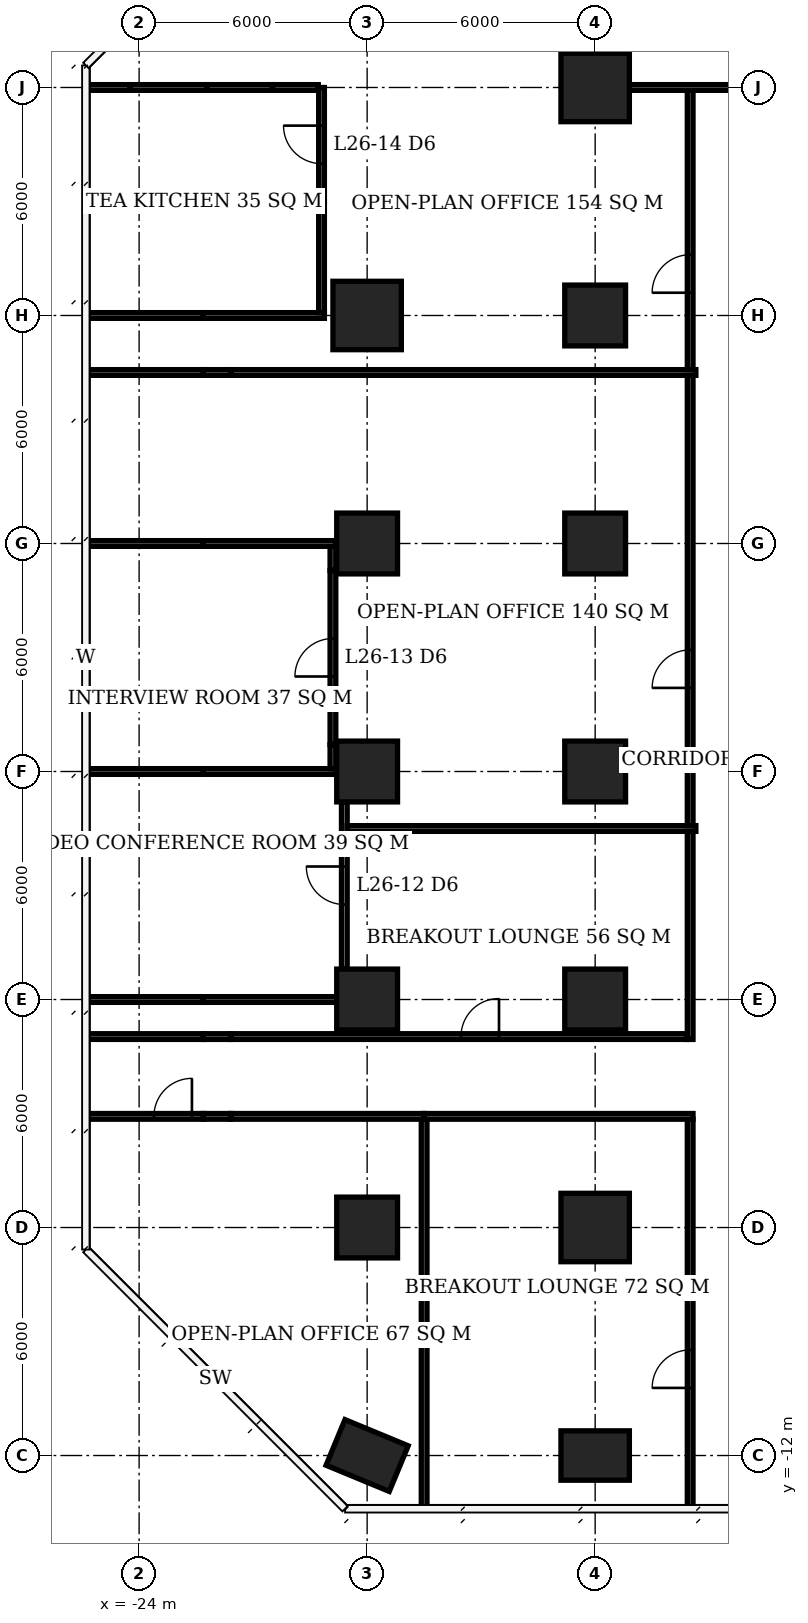
"""IFC4 building model, lengths in metres.
Left out: names, types, materials, properties, quantities, classifications, styles, units other than length and angle.
Written with IfcOpenShell. Run it as: python <this file> out.ifc"""

import sys

from ifc_helpers import new_model, si_unit, direction, frame, frame_2d, origin, origin_2d, place, context, subcontext, project, spatial, rectangle, extrude, element, fill, save


model = new_model("IFC4")
c1 = context("Model", 3, precision=1e-05, world=origin(), true_north=direction((0.0, 1.0)))
c2 = subcontext(c1, "Body", "Model", "MODEL_VIEW")
j1 = project(units=[si_unit("LENGTHUNIT", "METRE"), si_unit("PLANEANGLEUNIT", "RADIAN")], contexts=[c1])
p1 = place(None, origin())
s1 = spatial("IfcSite", under=j1, at=p1, CompositionType="ELEMENT")
p2 = place(p1, origin())
s2 = spatial("IfcBuilding", under=s1, at=p2, CompositionType="ELEMENT")
p3 = place(p2, frame((0.0, 0.0, 109.4)))
s3 = spatial("IfcBuildingStorey", under=s2, at=p3, CompositionType="ELEMENT", Elevation=109.4)
p4 = place(p3, frame((-18.0, -12.0, 0.0), z_axis=(0.0, 0.0, 1.0), x_axis=(-0.923879532511, 0.382683432365, 0.0)))
e1 = element("IfcColumn", 1, at=p4, inside=s3, PredefinedType="COLUMN", context=c2, shape_type="SweptSolid", body=[
    extrude(rectangle(XDim=1.8, YDim=1.3, at=origin_2d()), origin(), (0.0, 0.0, 1.0), 3.9),
])
for number, where, z_axis, x_axis in (
    (2, (-18.0, -6.0, 0.0), (0.0, 0.0, 1.0), (1.0, 0.0, 0.0)),
    (3, (-18.0, 0.0, 0.0), (0.0, 0.0, 1.0), (1.0, 0.0, 0.0)),
    (4, (-18.0, 6.0, 0.0), (0.0, 0.0, 1.0), (1.0, 0.0, 0.0)),
    (5, (-18.0, 12.0, 0.0), (0.0, 0.0, 1.0), (1.0, 0.0, 0.0)),
):
    element("IfcColumn", number, at=place(p3, frame(where, z_axis=z_axis, x_axis=x_axis)), inside=s3, PredefinedType="COLUMN", context=c2, shape_type="SweptSolid", body=[
        extrude(rectangle(XDim=1.6, YDim=1.6, at=origin_2d()), origin(), (0.0, 0.0, 1.0), 3.9),
    ])
p5 = place(p3, frame((-18.0, 18.0, 0.0), z_axis=(0.0, 0.0, 1.0), x_axis=(1.0, 0.0, 0.0)))
e6 = element("IfcColumn", 6, at=p5, inside=s3, PredefinedType="COLUMN", context=c2, shape_type="SweptSolid", body=[
    extrude(rectangle(XDim=1.8, YDim=1.8, at=origin_2d()), origin(), (0.0, 0.0, 1.0), 3.9),
])
p6 = place(p3, frame((-12.0, -12.0, 0.0), z_axis=(0.0, 0.0, 1.0), x_axis=(1.0, 0.0, 0.0)))
e7 = element("IfcColumn", 7, at=p6, inside=s3, PredefinedType="COLUMN", context=c2, shape_type="SweptSolid", body=[
    extrude(rectangle(XDim=1.8, YDim=1.3, at=origin_2d()), origin(), (0.0, 0.0, 1.0), 3.9),
])
p7 = place(p3, frame((-12.0, -6.0, 0.0), z_axis=(0.0, 0.0, 1.0), x_axis=(1.0, 0.0, 0.0)))
e8 = element("IfcColumn", 8, at=p7, inside=s3, PredefinedType="COLUMN", context=c2, shape_type="SweptSolid", body=[
    extrude(rectangle(XDim=1.8, YDim=1.8, at=origin_2d()), origin(), (0.0, 0.0, 1.0), 3.9),
])
for number, where, z_axis, x_axis in (
    (9, (-12.0, 0.0, 0.0), (0.0, 0.0, 1.0), (1.0, 0.0, 0.0)),
    (10, (-12.0, 6.0, 0.0), (0.0, 0.0, 1.0), (1.0, 0.0, 0.0)),
    (11, (-12.0, 12.0, 0.0), (0.0, 0.0, 1.0), (1.0, 0.0, 0.0)),
    (12, (-12.0, 18.0, 0.0), (0.0, 0.0, 1.0), (1.0, 0.0, 0.0)),
):
    element("IfcColumn", number, at=place(p3, frame(where, z_axis=z_axis, x_axis=x_axis)), inside=s3, PredefinedType="COLUMN", context=c2, shape_type="SweptSolid", body=[
        extrude(rectangle(XDim=1.6, YDim=1.6, at=origin_2d()), origin(), (0.0, 0.0, 1.0), 3.9),
    ])
p8 = place(p3, frame((-12.0, 24.0, 0.0), z_axis=(0.0, 0.0, 1.0), x_axis=(1.0, 0.0, 0.0)))
e13 = element("IfcColumn", 13, at=p8, inside=s3, PredefinedType="COLUMN", context=c2, shape_type="SweptSolid", body=[
    extrude(rectangle(XDim=1.8, YDim=1.8, at=origin_2d()), origin(), (0.0, 0.0, 1.0), 3.9),
])
p9 = place(p3, frame((-25.4, 0.0, 0.0), z_axis=(0.0, 0.0, 1.0), x_axis=(1.0, 0.0, 0.0)))
e14 = element("IfcWall", 14, at=p9, inside=s3, PredefinedType="PARTITIONING", context=c2, shape_type="SweptSolid", body=[
    extrude(rectangle(XDim=3.09, YDim=0.15, at=frame_2d((1.545, 0.0))), origin(), (0.0, 0.0, 1.0), 3.65),
])
p10 = place(p3, frame((-22.31, 0.0, 0.0), z_axis=(0.0, 0.0, 1.0), x_axis=(1.0, 0.0, 0.0)))
e15 = element("IfcWall", 15, at=p10, inside=s3, PredefinedType="PARTITIONING", context=c2, shape_type="SweptSolid", body=[
    extrude(rectangle(XDim=3.51, YDim=0.15, at=frame_2d((1.755, 0.0))), origin(), (0.0, 0.0, 1.0), 2.65),
])
p11 = place(p3, frame((-25.35, 6.0, 0.0), z_axis=(0.0, 0.0, 1.0), x_axis=(1.0, 0.0, 0.0)))
e16 = element("IfcWall", 16, at=p11, inside=s3, PredefinedType="PARTITIONING", context=c2, shape_type="SweptSolid", body=[
    extrude(rectangle(XDim=3.04, YDim=0.15, at=frame_2d((1.52, 0.0))), origin(), (0.0, 0.0, 1.0), 3.65),
])
p12 = place(p3, frame((-22.31, 6.0, 0.0), z_axis=(0.0, 0.0, 1.0), x_axis=(1.0, 0.0, 0.0)))
e17 = element("IfcWall", 17, at=p12, inside=s3, PredefinedType="PARTITIONING", context=c2, shape_type="SweptSolid", body=[
    extrude(rectangle(XDim=3.485, YDim=0.15, at=frame_2d((1.743, 0.0))), origin(), (0.0, 0.0, 1.0), 2.65),
])
p13 = place(p3, frame((-25.35, 12.0, 0.0), z_axis=(0.0, 0.0, 1.0), x_axis=(1.0, 0.0, 0.0)))
e18 = element("IfcWall", 18, at=p13, inside=s3, PredefinedType="PARTITIONING", context=c2, shape_type="SweptSolid", body=[
    extrude(rectangle(XDim=3.04, YDim=0.15, at=frame_2d((1.52, 0.0))), origin(), (0.0, 0.0, 1.0), 3.65),
])
p14 = place(p3, frame((-22.31, 12.0, 0.0), z_axis=(0.0, 0.0, 1.0), x_axis=(1.0, 0.0, 0.0)))
e19 = element("IfcWall", 19, at=p14, inside=s3, PredefinedType="PARTITIONING", context=c2, shape_type="SweptSolid", body=[
    extrude(rectangle(XDim=3.485, YDim=0.15, at=frame_2d((1.743, 0.0))), origin(), (0.0, 0.0, 1.0), 2.65),
])
p15 = place(p3, frame((-25.4, 18.0, 0.0), z_axis=(0.0, 0.0, 1.0), x_axis=(1.0, 0.0, 0.0)))
e20 = element("IfcWall", 20, at=p15, inside=s3, PredefinedType="PARTITIONING", context=c2, shape_type="SweptSolid", body=[
    extrude(rectangle(XDim=3.09, YDim=0.15, at=frame_2d((1.545, 0.0))), origin(), (0.0, 0.0, 1.0), 3.65),
])
p16 = place(p3, frame((-22.31, 18.0, 0.0), z_axis=(0.0, 0.0, 1.0), x_axis=(1.0, 0.0, 0.0)))
e21 = element("IfcWall", 21, at=p16, inside=s3, PredefinedType="PARTITIONING", context=c2, shape_type="SweptSolid", body=[
    extrude(rectangle(XDim=3.185, YDim=0.15, at=frame_2d((1.593, 0.0))), origin(), (0.0, 0.0, 1.0), 2.65),
])
p17 = place(p3, frame((-25.4, 24.0, 0.0), z_axis=(0.0, 0.0, 1.0), x_axis=(1.0, 0.0, 0.0)))
e22 = element("IfcWall", 22, at=p17, inside=s3, PredefinedType="PARTITIONING", context=c2, shape_type="SweptSolid", body=[
    extrude(rectangle(XDim=1.163, YDim=0.15, at=frame_2d((0.582, 0.0))), origin(), (0.0, 0.0, 1.0), 3.65),
])
p18 = place(p3, frame((-24.237, 24.0, 0.0), z_axis=(0.0, 0.0, 1.0), x_axis=(1.0, 0.0, 0.0)))
e23 = element("IfcWall", 23, at=p18, inside=s3, PredefinedType="PARTITIONING", context=c2, shape_type="SweptSolid", body=[
    extrude(rectangle(XDim=2.029, YDim=0.15, at=frame_2d((1.015, 0.0))), origin(), (0.0, 0.0, 1.0), 2.65),
])
p19 = place(p3, frame((-22.208, 24.0, 0.0), z_axis=(0.0, 0.0, 1.0), x_axis=(1.0, 0.0, 0.0)))
e24 = element("IfcWall", 24, at=p19, inside=s3, PredefinedType="PARTITIONING", context=c2, shape_type="SweptSolid", body=[
    extrude(rectangle(XDim=1.718, YDim=0.15, at=frame_2d((0.859, 0.0))), origin(), (0.0, 0.0, 1.0), 3.65),
])
p20 = place(p3, frame((-20.49, 24.0, 0.0), z_axis=(0.0, 0.0, 1.0), x_axis=(1.0, 0.0, 0.0)))
e25 = element("IfcWall", 25, at=p20, inside=s3, PredefinedType="PARTITIONING", context=c2, shape_type="SweptSolid", body=[
    extrude(rectangle(XDim=1.205, YDim=0.15, at=frame_2d((0.603, 0.0))), origin(), (0.0, 0.0, 1.0), 2.65),
])
p21 = place(p3, frame((-11.1, 24.0, 0.0), z_axis=(0.0, 0.0, 1.0), x_axis=(1.0, 0.0, 0.0)))
e26 = element("IfcWall", 26, at=p21, inside=s3, PredefinedType="PARTITIONING", context=c2, shape_type="SweptSolid", body=[
    extrude(rectangle(XDim=4.3, YDim=0.15, at=frame_2d((2.15, 0.0))), origin(), (0.0, 0.0, 1.0), 3.65),
])
p22 = place(p3, frame((-19.2, 18.075, 0.0), z_axis=(0.0, 0.0, 1.0), x_axis=(0.0, 1.0, 0.0)))
e27 = element("IfcWall", 27, at=p22, inside=s3, PredefinedType="PARTITIONING", context=c2, shape_type="SweptSolid", body=[
    extrude(rectangle(XDim=2.917, YDim=0.15, at=frame_2d((1.458, 0.0))), origin(), (0.0, 0.0, 1.0), 2.65),
])
p23 = place(p3, frame((-19.2, 20.992, 0.0), z_axis=(0.0, 0.0, 1.0), x_axis=(0.0, 1.0, 0.0)))
e28 = element("IfcWall", 28, at=p23, inside=s3, PredefinedType="PARTITIONING", context=c2, shape_type="SweptSolid", body=[
    extrude(rectangle(XDim=3.008, YDim=0.15, at=frame_2d((1.504, 0.0))), origin(), (0.0, 0.0, 1.0), 3.65),
])
p24 = place(p23, frame((1.004, 0.0, 0.0)))
e29 = element("IfcOpeningElement", 29, at=p24, cuts=e28, PredefinedType="OPENING", context=c2, shape_type="SweptSolid", body=[
    extrude(rectangle(XDim=1.0, YDim=2.1, at=frame_2d((0.5, 1.05))), frame((0.0, 0.085, 0.0), z_axis=(0.0, -1.0, 0.0), x_axis=(1.0, 0.0, 0.0)), (0.0, 0.0, 1.0), 0.17),
])
p25 = place(p3, frame((-18.9, 6.075, 0.0), z_axis=(0.0, 0.0, 1.0), x_axis=(0.0, 1.0, 0.0)))
e30 = element("IfcWall", 30, at=p25, inside=s3, PredefinedType="PARTITIONING", context=c2, shape_type="SweptSolid", body=[
    extrude(rectangle(XDim=0.635, YDim=0.15, at=frame_2d((0.317, 0.0))), origin(), (0.0, 0.0, 1.0), 2.65),
])
p26 = place(p3, frame((-18.9, 6.71, 0.0), z_axis=(0.0, 0.0, 1.0), x_axis=(0.0, 1.0, 0.0)))
e31 = element("IfcWall", 31, at=p26, inside=s3, PredefinedType="PARTITIONING", context=c2, shape_type="SweptSolid", body=[
    extrude(rectangle(XDim=4.58, YDim=0.15, at=frame_2d((2.29, 0.0))), origin(), (0.0, 0.0, 1.0), 3.65),
])
p27 = place(p26, frame((1.79, 0.0, 0.0)))
e32 = element("IfcOpeningElement", 32, at=p27, cuts=e31, PredefinedType="OPENING", context=c2, shape_type="SweptSolid", body=[
    extrude(rectangle(XDim=1.0, YDim=2.1, at=frame_2d((0.5, 1.05))), frame((0.0, 0.085, 0.0), z_axis=(0.0, -1.0, 0.0), x_axis=(1.0, 0.0, 0.0)), (0.0, 0.0, 1.0), 0.17),
])
p28 = place(p3, frame((-18.9, 11.29, 0.0), z_axis=(0.0, 0.0, 1.0), x_axis=(0.0, 1.0, 0.0)))
e33 = element("IfcWall", 33, at=p28, inside=s3, PredefinedType="PARTITIONING", context=c2, shape_type="SweptSolid", body=[
    extrude(rectangle(XDim=0.635, YDim=0.15, at=frame_2d((0.317, 0.0))), origin(), (0.0, 0.0, 1.0), 2.65),
])
p29 = place(p3, frame((-18.6, 0.8, 0.0), z_axis=(0.0, 0.0, 1.0), x_axis=(0.0, 1.0, 0.0)))
e34 = element("IfcWall", 34, at=p29, inside=s3, PredefinedType="PARTITIONING", context=c2, shape_type="SweptSolid", body=[
    extrude(rectangle(XDim=4.4, YDim=0.15, at=frame_2d((2.2, 0.0))), origin(), (0.0, 0.0, 1.0), 3.65),
])
p30 = place(p29, frame((1.7, 0.0, 0.0)))
e35 = element("IfcOpeningElement", 35, at=p30, cuts=e34, PredefinedType="OPENING", context=c2, shape_type="SweptSolid", body=[
    extrude(rectangle(XDim=1.0, YDim=2.1, at=frame_2d((0.5, 1.05))), frame((0.0, 0.085, 0.0), z_axis=(0.0, -1.0, 0.0), x_axis=(1.0, 0.0, 0.0)), (0.0, 0.0, 1.0), 0.17),
])
p31 = place(p3, frame((-12.0, 24.9, 0.0), z_axis=(0.0, 0.0, 1.0), x_axis=(0.0, 1.0, 0.0)))
e36 = element("IfcWall", 36, at=p31, inside=s3, PredefinedType="PARTITIONING", context=c2, shape_type="SweptSolid", body=[
    extrude(rectangle(XDim=3.41, YDim=0.15, at=frame_2d((1.705, 0.0))), origin(), (0.0, 0.0, 1.0), 2.65),
])
p32 = place(p3, frame((-25.4, -3.075, 0.0), z_axis=(0.0, 0.0, 1.0), x_axis=(1.0, 0.0, 0.0)))
e37 = element("IfcWall", 37, at=p32, inside=s3, PredefinedType="PARTITIONING", context=c2, shape_type="SweptSolid", body=[
    extrude(rectangle(XDim=3.09, YDim=0.15, at=frame_2d((1.545, 0.0))), origin(), (0.0, 0.0, 1.0), 3.65),
])
p33 = place(p32, frame((1.79, 0.0, 0.0)))
e38 = element("IfcOpeningElement", 38, at=p33, cuts=e37, PredefinedType="OPENING", context=c2, shape_type="SweptSolid", body=[
    extrude(rectangle(XDim=1.0, YDim=2.1, at=frame_2d((0.5, 1.05))), frame((0.0, 0.085, 0.0), z_axis=(0.0, -1.0, 0.0), x_axis=(1.0, 0.0, 0.0)), (0.0, 0.0, 1.0), 0.17),
])
p34 = place(p3, frame((-22.31, -3.075, 0.0), z_axis=(0.0, 0.0, 1.0), x_axis=(1.0, 0.0, 0.0)))
e39 = element("IfcWall", 39, at=p34, inside=s3, PredefinedType="PARTITIONING", context=c2, shape_type="SweptSolid", body=[
    extrude(rectangle(XDim=0.72, YDim=0.15, at=frame_2d((0.36, 0.0))), origin(), (0.0, 0.0, 1.0), 2.65),
])
p35 = place(p3, frame((-21.59, -3.075, 0.0), z_axis=(0.0, 0.0, 1.0), x_axis=(1.0, 0.0, 0.0)))
e40 = element("IfcWall", 40, at=p35, inside=s3, PredefinedType="PARTITIONING", context=c2, shape_type="SweptSolid", body=[
    extrude(rectangle(XDim=5.09, YDim=0.15, at=frame_2d((2.545, 0.0))), origin(), (0.0, 0.0, 1.0), 3.65),
])
p36 = place(p3, frame((-25.4, -0.975, 0.0), z_axis=(0.0, 0.0, 1.0), x_axis=(1.0, 0.0, 0.0)))
e41 = element("IfcWall", 41, at=p36, inside=s3, PredefinedType="PARTITIONING", context=c2, shape_type="SweptSolid", body=[
    extrude(rectangle(XDim=3.09, YDim=0.15, at=frame_2d((1.545, 0.0))), origin(), (0.0, 0.0, 1.0), 3.65),
])
p37 = place(p3, frame((-22.31, -0.975, 0.0), z_axis=(0.0, 0.0, 1.0), x_axis=(1.0, 0.0, 0.0)))
e42 = element("IfcWall", 42, at=p37, inside=s3, PredefinedType="PARTITIONING", context=c2, shape_type="SweptSolid", body=[
    extrude(rectangle(XDim=0.72, YDim=0.15, at=frame_2d((0.36, 0.0))), origin(), (0.0, 0.0, 1.0), 2.65),
])
p38 = place(p3, frame((-21.59, -0.975, 0.0), z_axis=(0.0, 0.0, 1.0), x_axis=(1.0, 0.0, 0.0)))
e43 = element("IfcWall", 43, at=p38, inside=s3, PredefinedType="PARTITIONING", context=c2, shape_type="SweptSolid", body=[
    extrude(rectangle(XDim=12.015, YDim=0.15, at=frame_2d((6.008, 0.0))), origin(), (0.0, 0.0, 1.0), 3.65),
])
p39 = place(p38, frame((6.06, 0.0, 0.0)))
e44 = element("IfcOpeningElement", 44, at=p39, cuts=e43, PredefinedType="OPENING", context=c2, shape_type="SweptSolid", body=[
    extrude(rectangle(XDim=1.0, YDim=2.1, at=frame_2d((0.5, 1.05))), frame((0.0, 0.085, 0.0), z_axis=(0.0, -1.0, 0.0), x_axis=(1.0, 0.0, 0.0)), (0.0, 0.0, 1.0), 0.17),
])
p40 = place(p3, frame((-25.4, 16.5, 0.0), z_axis=(0.0, 0.0, 1.0), x_axis=(1.0, 0.0, 0.0)))
e45 = element("IfcWall", 45, at=p40, inside=s3, PredefinedType="PARTITIONING", context=c2, shape_type="SweptSolid", body=[
    extrude(rectangle(XDim=3.09, YDim=0.15, at=frame_2d((1.545, 0.0))), origin(), (0.0, 0.0, 1.0), 3.65),
])
p41 = place(p3, frame((-22.31, 16.5, 0.0), z_axis=(0.0, 0.0, 1.0), x_axis=(1.0, 0.0, 0.0)))
e46 = element("IfcWall", 46, at=p41, inside=s3, PredefinedType="PARTITIONING", context=c2, shape_type="SweptSolid", body=[
    extrude(rectangle(XDim=0.72, YDim=0.15, at=frame_2d((0.36, 0.0))), origin(), (0.0, 0.0, 1.0), 2.65),
])
p42 = place(p3, frame((-21.59, 16.5, 0.0), z_axis=(0.0, 0.0, 1.0), x_axis=(1.0, 0.0, 0.0)))
e47 = element("IfcWall", 47, at=p42, inside=s3, PredefinedType="PARTITIONING", context=c2, shape_type="SweptSolid", body=[
    extrude(rectangle(XDim=12.24, YDim=0.15, at=frame_2d((6.12, 0.0))), origin(), (0.0, 0.0, 1.0), 3.65),
])
p43 = place(p3, frame((-18.525, 4.5, 0.0), z_axis=(0.0, 0.0, 1.0), x_axis=(1.0, 0.0, 0.0)))
e48 = element("IfcWall", 48, at=p43, inside=s3, PredefinedType="PARTITIONING", context=c2, shape_type="SweptSolid", body=[
    extrude(rectangle(XDim=9.175, YDim=0.15, at=frame_2d((4.587, 0.0))), origin(), (0.0, 0.0, 1.0), 3.65),
])
p44 = place(p3, frame((-16.5, -13.4, 0.0), z_axis=(0.0, 0.0, 1.0), x_axis=(0.0, 1.0, 0.0)))
e49 = element("IfcWall", 49, at=p44, inside=s3, PredefinedType="PARTITIONING", context=c2, shape_type="SweptSolid", body=[
    extrude(rectangle(XDim=10.25, YDim=0.15, at=frame_2d((5.125, 0.0))), origin(), (0.0, 0.0, 1.0), 3.65),
])
p45 = place(p3, frame((-16.5, -3.075, 0.0), z_axis=(0.0, 0.0, 1.0), x_axis=(1.0, 0.0, 0.0)))
e50 = element("IfcWall", 50, at=p45, inside=s3, PredefinedType="PARTITIONING", context=c2, shape_type="SweptSolid", body=[
    extrude(rectangle(XDim=7.075, YDim=0.15, at=frame_2d((3.538, 0.0))), origin(), (0.0, 0.0, 1.0), 3.65),
])
p46 = place(p3, frame((-9.5, -13.4, 0.0), z_axis=(0.0, 0.0, 1.0), x_axis=(0.0, 1.0, 0.0)))
e51 = element("IfcWall", 51, at=p46, inside=s3, PredefinedType="PARTITIONING", context=c2, shape_type="SweptSolid", body=[
    extrude(rectangle(XDim=10.25, YDim=0.15, at=frame_2d((5.125, 0.0))), origin(), (0.0, 0.0, 1.0), 3.65),
])
p47 = place(p46, frame((3.179, 0.0, 0.0)))
e52 = element("IfcOpeningElement", 52, at=p47, cuts=e51, PredefinedType="OPENING", context=c2, shape_type="SweptSolid", body=[
    extrude(rectangle(XDim=1.0, YDim=2.1, at=frame_2d((0.5, 1.05))), frame((0.0, 0.085, 0.0), z_axis=(0.0, -1.0, 0.0), x_axis=(1.0, 0.0, 0.0)), (0.0, 0.0, 1.0), 0.17),
])
p48 = place(p3, frame((-9.5, -1.05, 0.0), z_axis=(0.0, 0.0, 1.0), x_axis=(0.0, 1.0, 0.0)))
e53 = element("IfcWall", 53, at=p48, inside=s3, PredefinedType="PARTITIONING", context=c2, shape_type="SweptSolid", body=[
    extrude(rectangle(XDim=5.475, YDim=0.15, at=frame_2d((2.738, 0.0))), origin(), (0.0, 0.0, 1.0), 3.65),
])
p49 = place(p3, frame((-9.5, 4.575, 0.0), z_axis=(0.0, 0.0, 1.0), x_axis=(0.0, 1.0, 0.0)))
e54 = element("IfcWall", 54, at=p49, inside=s3, PredefinedType="PARTITIONING", context=c2, shape_type="SweptSolid", body=[
    extrude(rectangle(XDim=11.85, YDim=0.15, at=frame_2d((5.925, 0.0))), origin(), (0.0, 0.0, 1.0), 3.65),
])
p50 = place(p49, frame((3.625, 0.0, 0.0)))
e55 = element("IfcOpeningElement", 55, at=p50, cuts=e54, PredefinedType="OPENING", context=c2, shape_type="SweptSolid", body=[
    extrude(rectangle(XDim=1.0, YDim=2.1, at=frame_2d((0.5, 1.05))), frame((0.0, 0.085, 0.0), z_axis=(0.0, -1.0, 0.0), x_axis=(1.0, 0.0, 0.0)), (0.0, 0.0, 1.0), 0.17),
])
p51 = place(p3, frame((-9.5, 16.575, 0.0), z_axis=(0.0, 0.0, 1.0), x_axis=(0.0, 1.0, 0.0)))
e56 = element("IfcWall", 56, at=p51, inside=s3, PredefinedType="PARTITIONING", context=c2, shape_type="SweptSolid", body=[
    extrude(rectangle(XDim=7.35, YDim=0.15, at=frame_2d((3.675, 0.0))), origin(), (0.0, 0.0, 1.0), 3.65),
])
p52 = place(p51, frame((2.024, 0.0, 0.0)))
e57 = element("IfcOpeningElement", 57, at=p52, cuts=e56, PredefinedType="OPENING", context=c2, shape_type="SweptSolid", body=[
    extrude(rectangle(XDim=1.0, YDim=2.1, at=frame_2d((0.5, 1.05))), frame((0.0, 0.085, 0.0), z_axis=(0.0, -1.0, 0.0), x_axis=(1.0, 0.0, 0.0)), (0.0, 0.0, 1.0), 0.17),
])
p53 = place(p30, origin())
e58 = element("IfcDoor", 58, at=p53, inside=s3, OperationType="SINGLE_SWING_RIGHT", PredefinedType="DOOR", context=c2, shape_type="SweptSolid", body=[
    extrude(rectangle(XDim=1.0, YDim=2.1, at=frame_2d((0.5, 1.05))), frame((0.0, 0.025, 0.0), z_axis=(0.0, -1.0, 0.0), x_axis=(1.0, 0.0, 0.0)), (0.0, 0.0, 1.0), 0.05),
])
fill(e35, e58)
p54 = place(p27, origin())
e59 = element("IfcDoor", 59, at=p54, inside=s3, OperationType="SINGLE_SWING_LEFT", PredefinedType="DOOR", context=c2, shape_type="SweptSolid", body=[
    extrude(rectangle(XDim=1.0, YDim=2.1, at=frame_2d((0.5, 1.05))), frame((0.0, 0.025, 0.0), z_axis=(0.0, -1.0, 0.0), x_axis=(1.0, 0.0, 0.0)), (0.0, 0.0, 1.0), 0.05),
])
fill(e32, e59)
p55 = place(p24, origin())
e60 = element("IfcDoor", 60, at=p55, inside=s3, OperationType="SINGLE_SWING_RIGHT", PredefinedType="DOOR", context=c2, shape_type="SweptSolid", body=[
    extrude(rectangle(XDim=1.0, YDim=2.1, at=frame_2d((0.5, 1.05))), frame((0.0, 0.025, 0.0), z_axis=(0.0, -1.0, 0.0), x_axis=(1.0, 0.0, 0.0)), (0.0, 0.0, 1.0), 0.05),
])
fill(e29, e60)
p56 = place(p47, origin())
e61 = element("IfcDoor", 61, at=p56, inside=s3, OperationType="SINGLE_SWING_LEFT", PredefinedType="DOOR", context=c2, shape_type="SweptSolid", body=[
    extrude(rectangle(XDim=1.0, YDim=2.1, at=frame_2d((0.5, 1.05))), frame((0.0, 0.025, 0.0), z_axis=(0.0, -1.0, 0.0), x_axis=(1.0, 0.0, 0.0)), (0.0, 0.0, 1.0), 0.05),
])
fill(e52, e61)
p57 = place(p33, origin())
e62 = element("IfcDoor", 62, at=p57, inside=s3, OperationType="SINGLE_SWING_RIGHT", PredefinedType="DOOR", context=c2, shape_type="SweptSolid", body=[
    extrude(rectangle(XDim=1.0, YDim=2.1, at=frame_2d((0.5, 1.05))), frame((0.0, 0.025, 0.0), z_axis=(0.0, -1.0, 0.0), x_axis=(1.0, 0.0, 0.0)), (0.0, 0.0, 1.0), 0.05),
])
fill(e38, e62)
p58 = place(p39, origin())
e63 = element("IfcDoor", 63, at=p58, inside=s3, OperationType="SINGLE_SWING_RIGHT", PredefinedType="DOOR", context=c2, shape_type="SweptSolid", body=[
    extrude(rectangle(XDim=1.0, YDim=2.1, at=frame_2d((0.5, 1.05))), frame((0.0, 0.025, 0.0), z_axis=(0.0, -1.0, 0.0), x_axis=(1.0, 0.0, 0.0)), (0.0, 0.0, 1.0), 0.05),
])
fill(e44, e63)
p59 = place(p50, origin())
e64 = element("IfcDoor", 64, at=p59, inside=s3, OperationType="SINGLE_SWING_LEFT", PredefinedType="DOOR", context=c2, shape_type="SweptSolid", body=[
    extrude(rectangle(XDim=1.0, YDim=2.1, at=frame_2d((0.5, 1.05))), frame((0.0, 0.025, 0.0), z_axis=(0.0, -1.0, 0.0), x_axis=(1.0, 0.0, 0.0)), (0.0, 0.0, 1.0), 0.05),
])
fill(e55, e64)
p60 = place(p52, origin())
e65 = element("IfcDoor", 65, at=p60, inside=s3, OperationType="SINGLE_SWING_LEFT", PredefinedType="DOOR", context=c2, shape_type="SweptSolid", body=[
    extrude(rectangle(XDim=1.0, YDim=2.1, at=frame_2d((0.5, 1.05))), frame((0.0, 0.025, 0.0), z_axis=(0.0, -1.0, 0.0), x_axis=(1.0, 0.0, 0.0)), (0.0, 0.0, 1.0), 0.05),
])
fill(e57, e65)
save(model, sys.argv[1])
